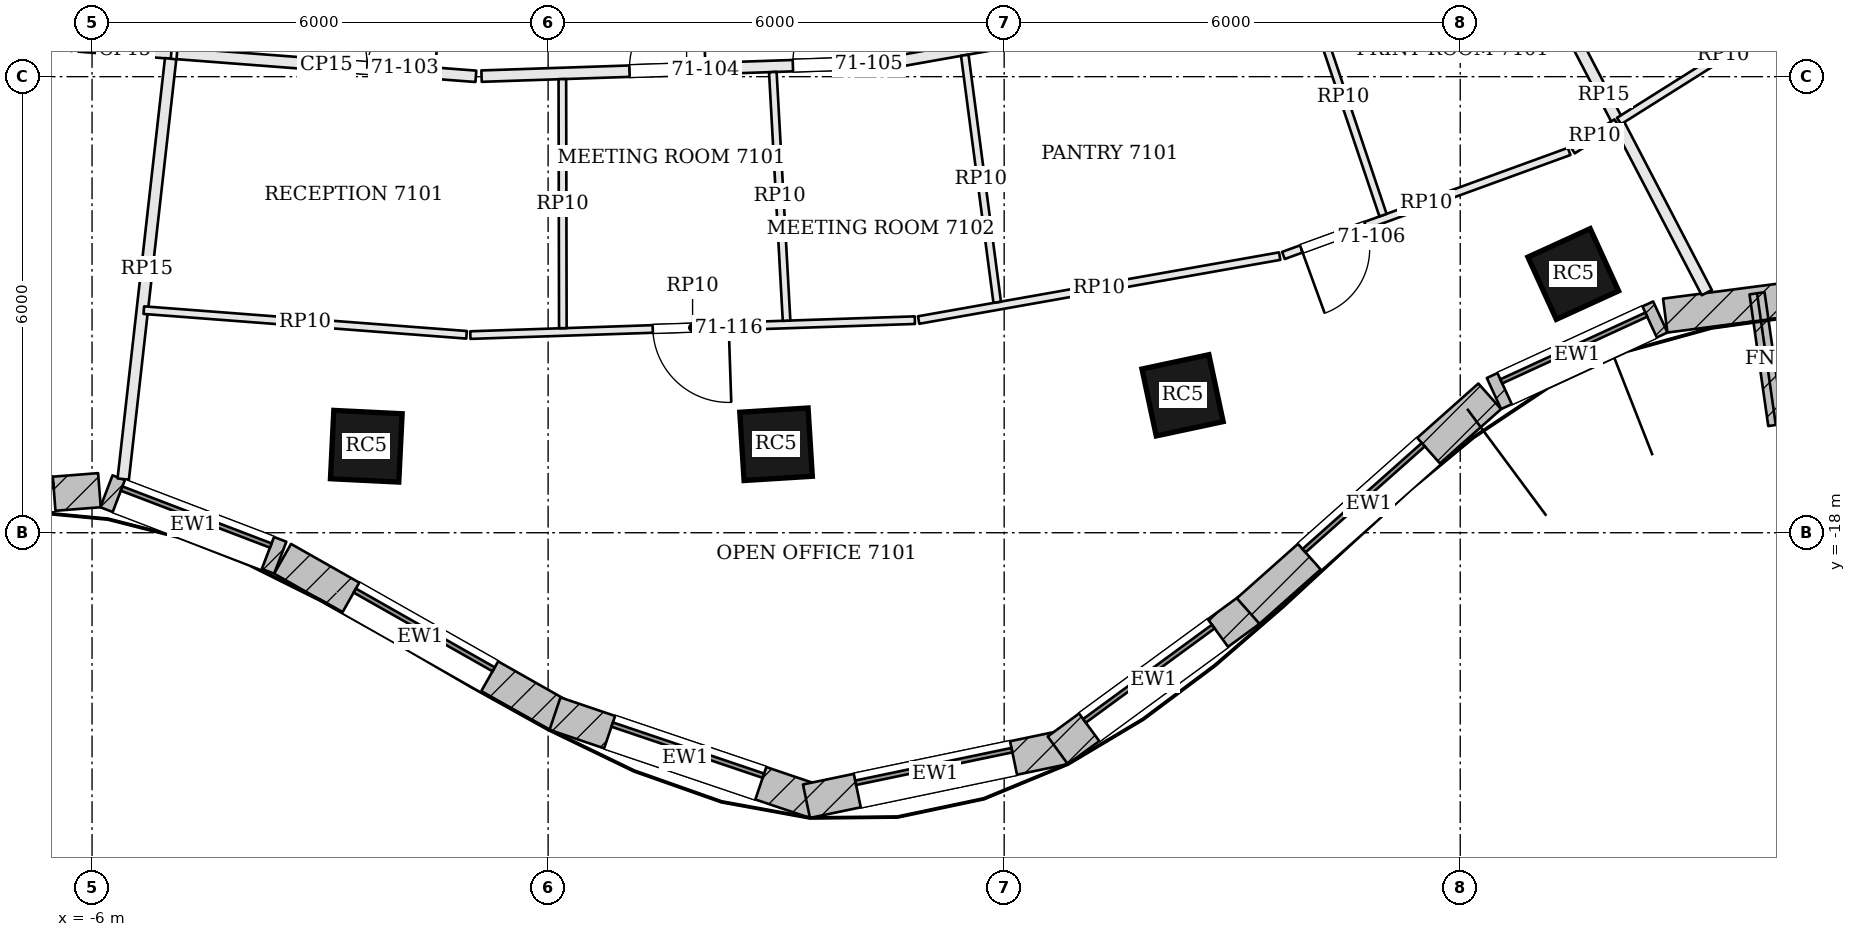
"""IFC4 building model, lengths in metres.
Left out: names, types, materials, properties, quantities, classifications, styles, units other than length and angle.
Written with IfcOpenShell. Run it as: python <this file> out.ifc"""

import sys

from ifc_helpers import new_model, si_unit, direction, frame, frame_2d, origin, origin_2d, place, context, subcontext, project, spatial, rectangle, extrude, element, fill, save


model = new_model("IFC4")
c1 = context("Model", 3, precision=1e-05, world=origin(), true_north=direction((0.0, 1.0)))
c2 = subcontext(c1, "Body", "Model", "MODEL_VIEW")
j1 = project(units=[si_unit("LENGTHUNIT", "METRE"), si_unit("PLANEANGLEUNIT", "RADIAN")], contexts=[c1])
p1 = place(None, origin())
s1 = spatial("IfcSite", under=j1, at=p1, CompositionType="ELEMENT")
p2 = place(p1, origin())
s2 = spatial("IfcBuilding", under=s1, at=p2, CompositionType="ELEMENT")
p3 = place(p2, frame((0.0, 0.0, 288.3)))
s3 = spatial("IfcBuildingStorey", under=s2, at=p3, CompositionType="ELEMENT", Elevation=288.3)
for number, where, z_axis, x_axis in (
    (1, (-2.392, -16.862, 0.0), (0.0, 0.0, 1.0), (0.999, -0.049, 0.0)),
    (2, (2.999, -16.836, 0.0), (0.0, 0.0, 1.0), (0.998, 0.062, 0.0)),
    (3, (8.347, -16.192, 0.0), (0.0, 0.0, 1.0), (0.978, 0.209, 0.0)),
    (4, (13.487, -14.596, 0.0), (0.0, 0.0, 1.0), (0.91, 0.415, 0.0)),
):
    element("IfcColumn", number, at=place(p3, frame(where, z_axis=z_axis, x_axis=x_axis)), inside=s3, PredefinedType="COLUMN", context=c2, shape_type="SweptSolid", body=[
        extrude(rectangle(XDim=0.9, YDim=0.9, at=origin_2d()), origin(), (0.0, 0.0, 1.0), 3.9),
    ])
p4 = place(p3, frame((-9.188, -17.697, 0.0), z_axis=(0.0, 0.0, 1.0), x_axis=(0.996964028691, 0.077863505548, 0.0)))
e5 = element("IfcWall", 5, at=p4, inside=s3, PredefinedType="SOLIDWALL", context=c2, shape_type="SweptSolid", body=[
    extrude(rectangle(XDim=3.295, YDim=0.45, at=frame_2d((1.648, 0.0))), origin(), (0.0, 0.0, 1.0), 3.7),
])
p5 = place(p4, frame((0.598, 0.0, 0.9)))
e6 = element("IfcOpeningElement", 6, at=p5, cuts=e5, PredefinedType="OPENING", context=c2, shape_type="SweptSolid", body=[
    extrude(rectangle(XDim=2.1, YDim=2.3, at=frame_2d((1.05, 1.15))), frame((0.0, 0.235, 0.0), z_axis=(0.0, -1.0, 0.0), x_axis=(1.0, 0.0, 0.0)), (0.0, 0.0, 1.0), 0.47),
])
p6 = place(p3, frame((-5.811, -17.455, 0.0), z_axis=(0.0, 0.0, 1.0), x_axis=(0.934122271306, -0.35695319336, 0.0)))
e7 = element("IfcWall", 7, at=p6, inside=s3, PredefinedType="SOLIDWALL", context=c2, shape_type="SweptSolid", body=[
    extrude(rectangle(XDim=2.448, YDim=0.45, at=frame_2d((1.224, 0.0))), origin(), (0.0, 0.0, 1.0), 3.7),
])
p7 = place(p6, frame((0.174, 0.0, 0.9)))
e8 = element("IfcOpeningElement", 8, at=p7, cuts=e7, PredefinedType="OPENING", context=c2, shape_type="SweptSolid", body=[
    extrude(rectangle(XDim=2.1, YDim=2.3, at=frame_2d((1.05, 1.15))), frame((0.0, 0.235, 0.0), z_axis=(0.0, -1.0, 0.0), x_axis=(1.0, 0.0, 0.0)), (0.0, 0.0, 1.0), 0.47),
])
p8 = place(p3, frame((-3.493, -18.343, 0.0), z_axis=(0.0, 0.0, 1.0), x_axis=(0.869825988853, -0.493358641473, 0.0)))
e9 = element("IfcWall", 9, at=p8, inside=s3, PredefinedType="SOLIDWALL", context=c2, shape_type="SweptSolid", body=[
    extrude(rectangle(XDim=4.165, YDim=0.45, at=frame_2d((2.083, 0.0))), origin(), (0.0, 0.0, 1.0), 3.7),
])
p9 = place(p8, frame((1.032, 0.0, 0.9)))
e10 = element("IfcOpeningElement", 10, at=p9, cuts=e9, PredefinedType="OPENING", context=c2, shape_type="SweptSolid", body=[
    extrude(rectangle(XDim=2.1, YDim=2.3, at=frame_2d((1.05, 1.15))), frame((0.0, 0.235, 0.0), z_axis=(0.0, -1.0, 0.0), x_axis=(1.0, 0.0, 0.0)), (0.0, 0.0, 1.0), 0.47),
])
p10 = place(p3, frame((0.091, -20.38, 0.0), z_axis=(0.0, 0.0, 1.0), x_axis=(0.947304227221, -0.320335294791, 0.0)))
e11 = element("IfcWall", 11, at=p10, inside=s3, PredefinedType="SOLIDWALL", context=c2, shape_type="SweptSolid", body=[
    extrude(rectangle(XDim=3.617, YDim=0.45, at=frame_2d((1.809, 0.0))), origin(), (0.0, 0.0, 1.0), 3.7),
])
p11 = place(p10, frame((0.759, 0.0, 0.9)))
e12 = element("IfcOpeningElement", 12, at=p11, cuts=e11, PredefinedType="OPENING", context=c2, shape_type="SweptSolid", body=[
    extrude(rectangle(XDim=2.1, YDim=2.3, at=frame_2d((1.05, 1.15))), frame((0.0, 0.235, 0.0), z_axis=(0.0, -1.0, 0.0), x_axis=(1.0, 0.0, 0.0)), (0.0, 0.0, 1.0), 0.47),
])
p12 = place(p3, frame((3.399, -21.532, 0.0), z_axis=(0.0, 0.0, 1.0), x_axis=(0.978915912181, 0.204263645512, 0.0)))
e13 = element("IfcWall", 13, at=p12, inside=s3, PredefinedType="SOLIDWALL", context=c2, shape_type="SweptSolid", body=[
    extrude(rectangle(XDim=3.466, YDim=0.45, at=frame_2d((1.733, 0.0))), origin(), (0.0, 0.0, 1.0), 3.7),
])
p13 = place(p12, frame((0.683, 0.0, 0.9)))
e14 = element("IfcOpeningElement", 14, at=p13, cuts=e13, PredefinedType="OPENING", context=c2, shape_type="SweptSolid", body=[
    extrude(rectangle(XDim=2.1, YDim=2.3, at=frame_2d((1.05, 1.15))), frame((0.0, 0.235, 0.0), z_axis=(0.0, -1.0, 0.0), x_axis=(1.0, 0.0, 0.0)), (0.0, 0.0, 1.0), 0.47),
])
p14 = place(p3, frame((6.705, -20.862, 0.0), z_axis=(0.0, 0.0, 1.0), x_axis=(0.806921336267, 0.590658917716, 0.0)))
e15 = element("IfcWall", 15, at=p14, inside=s3, PredefinedType="SOLIDWALL", context=c2, shape_type="SweptSolid", body=[
    extrude(rectangle(XDim=3.125, YDim=0.45, at=frame_2d((1.562, 0.0))), origin(), (0.0, 0.0, 1.0), 3.7),
])
p15 = place(p14, frame((0.512, 0.0, 0.9)))
e16 = element("IfcOpeningElement", 16, at=p15, cuts=e15, PredefinedType="OPENING", context=c2, shape_type="SweptSolid", body=[
    extrude(rectangle(XDim=2.1, YDim=2.3, at=frame_2d((1.05, 1.15))), frame((0.0, 0.235, 0.0), z_axis=(0.0, -1.0, 0.0), x_axis=(1.0, 0.0, 0.0)), (0.0, 0.0, 1.0), 0.47),
])
p16 = place(p3, frame((9.21, -19.03, 0.0), z_axis=(0.0, 0.0, 1.0), x_axis=(0.747396648191, 0.664378092861, 0.0)))
e17 = element("IfcWall", 17, at=p16, inside=s3, PredefinedType="SOLIDWALL", context=c2, shape_type="SweptSolid", body=[
    extrude(rectangle(XDim=4.252, YDim=0.45, at=frame_2d((2.126, 0.0))), origin(), (0.0, 0.0, 1.0), 3.7),
])
p17 = place(p16, frame((1.076, 0.0, 0.9)))
e18 = element("IfcOpeningElement", 18, at=p17, cuts=e17, PredefinedType="OPENING", context=c2, shape_type="SweptSolid", body=[
    extrude(rectangle(XDim=2.1, YDim=2.3, at=frame_2d((1.05, 1.15))), frame((0.0, 0.235, 0.0), z_axis=(0.0, -1.0, 0.0), x_axis=(1.0, 0.0, 0.0)), (0.0, 0.0, 1.0), 0.47),
])
p18 = place(p3, frame((12.444, -16.169, 0.0), z_axis=(0.0, 0.0, 1.0), x_axis=(0.908468904074, 0.417952449844, 0.0)))
e19 = element("IfcWall", 19, at=p18, inside=s3, PredefinedType="SOLIDWALL", context=c2, shape_type="SweptSolid", body=[
    extrude(rectangle(XDim=2.409, YDim=0.45, at=frame_2d((1.205, 0.0))), origin(), (0.0, 0.0, 1.0), 3.7),
])
p19 = place(p18, frame((0.155, 0.0, 0.9)))
e20 = element("IfcOpeningElement", 20, at=p19, cuts=e19, PredefinedType="OPENING", context=c2, shape_type="SweptSolid", body=[
    extrude(rectangle(XDim=2.1, YDim=2.3, at=frame_2d((1.05, 1.15))), frame((0.0, 0.235, 0.0), z_axis=(0.0, -1.0, 0.0), x_axis=(1.0, 0.0, 0.0)), (0.0, 0.0, 1.0), 0.47),
])
p20 = place(p3, frame((14.697, -15.143, 0.0), z_axis=(0.0, 0.0, 1.0), x_axis=(0.991631798411, 0.129098320597, 0.0)))
e21 = element("IfcWall", 21, at=p20, inside=s3, PredefinedType="SOLIDWALL", context=c2, shape_type="SweptSolid", body=[
    extrude(rectangle(XDim=5.547, YDim=0.45, at=frame_2d((2.773, 0.0))), origin(), (0.0, 0.0, 1.0), 3.7),
])
p21 = place(p20, frame((1.723, 0.0, 0.9)))
e22 = element("IfcOpeningElement", 22, at=p21, cuts=e21, PredefinedType="OPENING", context=c2, shape_type="SweptSolid", body=[
    extrude(rectangle(XDim=2.1, YDim=2.3, at=frame_2d((1.05, 1.15))), frame((0.0, 0.235, 0.0), z_axis=(0.0, -1.0, 0.0), x_axis=(1.0, 0.0, 0.0)), (0.0, 0.0, 1.0), 0.47),
])
p22 = place(p3, frame((15.905, -14.85, 0.0), z_axis=(0.0, 0.0, 1.0), x_axis=(0.140913490987, -0.990021912918, 0.0)))
e23 = element("IfcWall", 23, at=p22, inside=s3, PredefinedType="SOLIDWALL", context=c2, shape_type="SweptSolid", body=[
    extrude(rectangle(XDim=1.75, YDim=0.2, at=frame_2d((0.875, 0.0))), origin(), (0.0, 0.0, 1.0), 3.7),
])
p23 = place(p3, frame((-6.175, -11.596, 0.0), z_axis=(0.0, 0.0, 1.0), x_axis=(0.997106038867, -0.076023333621, 0.0)))
e24 = element("IfcWall", 24, at=p23, inside=s3, PredefinedType="PARTITIONING", context=c2, shape_type="SweptSolid", body=[
    extrude(rectangle(XDim=1.22, YDim=0.15, at=frame_2d((0.61, 0.0))), origin(), (0.0, 0.0, 1.0), 3.198),
])
p24 = place(p3, frame((-5.59, -17.294, 0.0), z_axis=(0.0, 0.0, 1.0), x_axis=(0.112044411854, 0.993703200041, 0.0)))
e25 = element("IfcWall", 25, at=p24, inside=s3, PredefinedType="PARTITIONING", context=c2, shape_type="SweptSolid", body=[
    extrude(rectangle(XDim=5.565, YDim=0.15, at=frame_2d((2.783, 0.0))), origin(), (0.0, 0.0, 1.0), 3.234),
])
p25 = place(p3, frame((-4.883, -11.695, 0.0), z_axis=(0.0, 0.0, 1.0), x_axis=(0.997096936577, -0.076142623207, 0.0)))
e26 = element("IfcWall", 26, at=p25, inside=s3, PredefinedType="PARTITIONING", context=c2, shape_type="SweptSolid", body=[
    extrude(rectangle(XDim=3.944, YDim=0.15, at=frame_2d((1.972, 0.0))), origin(), (0.0, 0.0, 1.0), 3.198),
])
p26 = place(p25, frame((1.604, 0.0, 0.0)))
e27 = element("IfcOpeningElement", 27, at=p26, cuts=e26, PredefinedType="OPENING", context=c2, shape_type="SweptSolid", body=[
    extrude(rectangle(XDim=1.8, YDim=2.1, at=frame_2d((0.9, 1.05))), frame((0.0, 0.085, 0.0), z_axis=(0.0, -1.0, 0.0), x_axis=(1.0, 0.0, 0.0)), (0.0, 0.0, 1.0), 0.17),
])
p27 = place(p3, frame((-0.875, -11.993, 0.0), z_axis=(0.0, 0.0, 1.0), x_axis=(0.999436745295, 0.033558786542, 0.0)))
e28 = element("IfcWall", 28, at=p27, inside=s3, PredefinedType="PARTITIONING", context=c2, shape_type="SweptSolid", body=[
    extrude(rectangle(XDim=5.398, YDim=0.15, at=frame_2d((2.699, 0.0))), origin(), (0.0, 0.0, 1.0), 3.198),
])
p28 = place(p27, frame((1.947, 0.0, 0.0)))
e29 = element("IfcOpeningElement", 29, at=p28, cuts=e28, PredefinedType="OPENING", context=c2, shape_type="SweptSolid", body=[
    extrude(rectangle(XDim=1.0, YDim=2.4, at=frame_2d((0.5, 1.2))), frame((0.0, 0.085, 0.0), z_axis=(0.0, -1.0, 0.0), x_axis=(1.0, 0.0, 0.0)), (0.0, 0.0, 1.0), 0.17),
])
p29 = place(p27, frame((4.098, 0.0, 0.0)))
e30 = element("IfcOpeningElement", 30, at=p29, cuts=e28, PredefinedType="OPENING", context=c2, shape_type="SweptSolid", body=[
    extrude(rectangle(XDim=1.0, YDim=2.4, at=frame_2d((0.5, 1.2))), frame((0.0, 0.085, 0.0), z_axis=(0.0, -1.0, 0.0), x_axis=(1.0, 0.0, 0.0)), (0.0, 0.0, 1.0), 0.17),
])
p30 = place(p3, frame((4.594, -11.799, 0.0), z_axis=(0.0, 0.0, 1.0), x_axis=(0.984693444773, 0.174295208833, 0.0)))
e31 = element("IfcWall", 31, at=p30, inside=s3, PredefinedType="PARTITIONING", context=c2, shape_type="SweptSolid", body=[
    extrude(rectangle(XDim=4.261, YDim=0.15, at=frame_2d((2.13, 0.0))), origin(), (0.0, 0.0, 1.0), 3.198),
])
p31 = place(p30, frame((2.05, 0.0, 0.0)))
e32 = element("IfcOpeningElement", 32, at=p31, cuts=e31, PredefinedType="OPENING", context=c2, shape_type="SweptSolid", body=[
    extrude(rectangle(XDim=1.0, YDim=2.1, at=frame_2d((0.5, 1.05))), frame((0.0, 0.085, 0.0), z_axis=(0.0, -1.0, 0.0), x_axis=(1.0, 0.0, 0.0)), (0.0, 0.0, 1.0), 0.17),
])
p32 = place(p3, frame((15.244, -14.841, 0.0), z_axis=(0.0, 0.0, 1.0), x_axis=(-0.462122511499, 0.886816093881, 0.0)))
e33 = element("IfcWall", 33, at=p32, inside=s3, PredefinedType="PARTITIONING", context=c2, shape_type="SweptSolid", body=[
    extrude(rectangle(XDim=5.871, YDim=0.15, at=frame_2d((2.935, 0.0))), origin(), (0.0, 0.0, 1.0), 3.234),
])
p33 = place(p3, frame((14.056, -12.604, 0.0), z_axis=(0.0, 0.0, 1.0), x_axis=(-0.846544184051, -0.532318461496, 0.0)))
e34 = element("IfcWall", 34, at=p33, inside=s3, PredefinedType="PARTITIONING", context=c2, shape_type="SweptSolid", body=[
    extrude(rectangle(XDim=0.681, YDim=0.1, at=frame_2d((0.34, 0.0))), origin(), (0.0, 0.0, 1.0), 3.198),
])
p34 = place(p3, frame((13.433, -12.984, 0.0), z_axis=(0.0, 0.0, 1.0), x_axis=(-0.939673979614, -0.342071355182, 0.0)))
e35 = element("IfcWall", 35, at=p34, inside=s3, PredefinedType="PARTITIONING", context=c2, shape_type="SweptSolid", body=[
    extrude(rectangle(XDim=4.0, YDim=0.1, at=frame_2d((2.0, 0.0))), origin(), (0.0, 0.0, 1.0), 3.198),
])
p35 = place(p34, frame((2.85, 0.0, 0.0)))
e36 = element("IfcOpeningElement", 36, at=p35, cuts=e35, PredefinedType="OPENING", context=c2, shape_type="SweptSolid", body=[
    extrude(rectangle(XDim=0.9, YDim=2.1, at=frame_2d((0.45, 1.05))), frame((0.0, 0.06, 0.0), z_axis=(0.0, -1.0, 0.0), x_axis=(1.0, 0.0, 0.0)), (0.0, 0.0, 1.0), 0.12),
])
p36 = place(p3, frame((9.625, -14.361, 0.0), z_axis=(0.0, 0.0, 1.0), x_axis=(-0.984691710098, -0.174305008716, 0.0)))
e37 = element("IfcWall", 37, at=p36, inside=s3, PredefinedType="PARTITIONING", context=c2, shape_type="SweptSolid", body=[
    extrude(rectangle(XDim=4.824, YDim=0.1, at=frame_2d((2.412, 0.0))), origin(), (0.0, 0.0, 1.0), 3.198),
])
p37 = place(p3, frame((4.825, -15.203, 0.0), z_axis=(0.0, 0.0, 1.0), x_axis=(-0.999435699456, -0.033589918924, 0.0)))
e38 = element("IfcWall", 38, at=p37, inside=s3, PredefinedType="PARTITIONING", context=c2, shape_type="SweptSolid", body=[
    extrude(rectangle(XDim=5.851, YDim=0.1, at=frame_2d((2.926, 0.0))), origin(), (0.0, 0.0, 1.0), 3.198),
])
p38 = place(p37, frame((2.45, 0.0, 0.0)))
e39 = element("IfcOpeningElement", 39, at=p38, cuts=e38, PredefinedType="OPENING", context=c2, shape_type="SweptSolid", body=[
    extrude(rectangle(XDim=1.0, YDim=2.4, at=frame_2d((0.5, 1.2))), frame((0.0, 0.06, 0.0), z_axis=(0.0, -1.0, 0.0), x_axis=(1.0, 0.0, 0.0)), (0.0, 0.0, 1.0), 0.12),
])
p39 = place(p3, frame((-1.073, -15.396, 0.0), z_axis=(0.0, 0.0, 1.0), x_axis=(-0.997093140471, 0.076192317369, 0.0)))
e40 = element("IfcWall", 40, at=p39, inside=s3, PredefinedType="PARTITIONING", context=c2, shape_type="SweptSolid", body=[
    extrude(rectangle(XDim=4.259, YDim=0.1, at=frame_2d((2.129, 0.0))), origin(), (0.0, 0.0, 1.0), 3.198),
])
p40 = place(p3, frame((0.188, -12.032, 0.0), z_axis=(0.0, 0.0, 1.0), x_axis=(0.001937258864, -0.999998123512, 0.0)))
e41 = element("IfcWall", 41, at=p40, inside=s3, PredefinedType="PARTITIONING", context=c2, shape_type="SweptSolid", body=[
    extrude(rectangle(XDim=3.277, YDim=0.1, at=frame_2d((1.638, 0.0))), origin(), (0.0, 0.0, 1.0), 3.198),
])
p41 = place(p3, frame((2.956, -11.939, 0.0), z_axis=(0.0, 0.0, 1.0), x_axis=(0.055226477976, -0.998473853504, 0.0)))
e42 = element("IfcWall", 42, at=p41, inside=s3, PredefinedType="PARTITIONING", context=c2, shape_type="SweptSolid", body=[
    extrude(rectangle(XDim=3.276, YDim=0.1, at=frame_2d((1.638, 0.0))), origin(), (0.0, 0.0, 1.0), 3.198),
])
p42 = place(p3, frame((5.482, -11.718, 0.0), z_axis=(0.0, 0.0, 1.0), x_axis=(0.130173255727, -0.991491262439, 0.0)))
e43 = element("IfcWall", 43, at=p42, inside=s3, PredefinedType="PARTITIONING", context=c2, shape_type="SweptSolid", body=[
    extrude(rectangle(XDim=3.278, YDim=0.1, at=frame_2d((1.639, 0.0))), origin(), (0.0, 0.0, 1.0), 3.198),
])
p43 = place(p3, frame((9.94, -10.717, 0.0), z_axis=(0.0, 0.0, 1.0), x_axis=(0.318730603816, -0.947845347191, 0.0)))
e44 = element("IfcWall", 44, at=p43, inside=s3, PredefinedType="PARTITIONING", context=c2, shape_type="SweptSolid", body=[
    extrude(rectangle(XDim=3.276, YDim=0.1, at=frame_2d((1.638, 0.0))), origin(), (0.0, 0.0, 1.0), 3.198),
])
p44 = place(p3, frame((16.831, -10.858, 0.0), z_axis=(0.0, 0.0, 1.0), x_axis=(-0.846427876971, -0.532503379413, 0.0)))
e45 = element("IfcWall", 45, at=p44, inside=s3, PredefinedType="PARTITIONING", context=c2, shape_type="SweptSolid", body=[
    extrude(rectangle(XDim=3.239, YDim=0.1, at=frame_2d((1.62, 0.0))), origin(), (0.0, 0.0, 1.0), 3.198),
])
p45 = place(p5, origin())
e46 = element("IfcWindow", 46, at=p45, inside=s3, PartitioningType="SINGLE_PANEL", PredefinedType="WINDOW", context=c2, shape_type="SweptSolid", body=[
    extrude(rectangle(XDim=2.1, YDim=2.3, at=frame_2d((1.05, 1.15))), frame((0.0, 0.135, 0.0), z_axis=(0.0, -1.0, 0.0), x_axis=(1.0, 0.0, 0.0)), (0.0, 0.0, 1.0), 0.06),
])
fill(e6, e46)
p46 = place(p7, origin())
e47 = element("IfcWindow", 47, at=p46, inside=s3, PartitioningType="SINGLE_PANEL", PredefinedType="WINDOW", context=c2, shape_type="SweptSolid", body=[
    extrude(rectangle(XDim=2.1, YDim=2.3, at=frame_2d((1.05, 1.15))), frame((0.0, 0.135, 0.0), z_axis=(0.0, -1.0, 0.0), x_axis=(1.0, 0.0, 0.0)), (0.0, 0.0, 1.0), 0.06),
])
fill(e8, e47)
p47 = place(p9, origin())
e48 = element("IfcWindow", 48, at=p47, inside=s3, PartitioningType="SINGLE_PANEL", PredefinedType="WINDOW", context=c2, shape_type="SweptSolid", body=[
    extrude(rectangle(XDim=2.1, YDim=2.3, at=frame_2d((1.05, 1.15))), frame((0.0, 0.135, 0.0), z_axis=(0.0, -1.0, 0.0), x_axis=(1.0, 0.0, 0.0)), (0.0, 0.0, 1.0), 0.06),
])
fill(e10, e48)
p48 = place(p11, origin())
e49 = element("IfcWindow", 49, at=p48, inside=s3, PartitioningType="SINGLE_PANEL", PredefinedType="WINDOW", context=c2, shape_type="SweptSolid", body=[
    extrude(rectangle(XDim=2.1, YDim=2.3, at=frame_2d((1.05, 1.15))), frame((0.0, 0.135, 0.0), z_axis=(0.0, -1.0, 0.0), x_axis=(1.0, 0.0, 0.0)), (0.0, 0.0, 1.0), 0.06),
])
fill(e12, e49)
p49 = place(p13, origin())
e50 = element("IfcWindow", 50, at=p49, inside=s3, PartitioningType="SINGLE_PANEL", PredefinedType="WINDOW", context=c2, shape_type="SweptSolid", body=[
    extrude(rectangle(XDim=2.1, YDim=2.3, at=frame_2d((1.05, 1.15))), frame((0.0, 0.135, 0.0), z_axis=(0.0, -1.0, 0.0), x_axis=(1.0, 0.0, 0.0)), (0.0, 0.0, 1.0), 0.06),
])
fill(e14, e50)
p50 = place(p15, origin())
e51 = element("IfcWindow", 51, at=p50, inside=s3, PartitioningType="SINGLE_PANEL", PredefinedType="WINDOW", context=c2, shape_type="SweptSolid", body=[
    extrude(rectangle(XDim=2.1, YDim=2.3, at=frame_2d((1.05, 1.15))), frame((0.0, 0.135, 0.0), z_axis=(0.0, -1.0, 0.0), x_axis=(1.0, 0.0, 0.0)), (0.0, 0.0, 1.0), 0.06),
])
fill(e16, e51)
p51 = place(p17, origin())
e52 = element("IfcWindow", 52, at=p51, inside=s3, PartitioningType="SINGLE_PANEL", PredefinedType="WINDOW", context=c2, shape_type="SweptSolid", body=[
    extrude(rectangle(XDim=2.1, YDim=2.3, at=frame_2d((1.05, 1.15))), frame((0.0, 0.135, 0.0), z_axis=(0.0, -1.0, 0.0), x_axis=(1.0, 0.0, 0.0)), (0.0, 0.0, 1.0), 0.06),
])
fill(e18, e52)
p52 = place(p19, origin())
e53 = element("IfcWindow", 53, at=p52, inside=s3, PartitioningType="SINGLE_PANEL", PredefinedType="WINDOW", context=c2, shape_type="SweptSolid", body=[
    extrude(rectangle(XDim=2.1, YDim=2.3, at=frame_2d((1.05, 1.15))), frame((0.0, 0.135, 0.0), z_axis=(0.0, -1.0, 0.0), x_axis=(1.0, 0.0, 0.0)), (0.0, 0.0, 1.0), 0.06),
])
fill(e20, e53)
p53 = place(p26, origin())
e54 = element("IfcDoor", 54, at=p53, inside=s3, OperationType="DOUBLE_DOOR_SINGLE_SWING", PredefinedType="DOOR", context=c2, shape_type="SweptSolid", body=[
    extrude(rectangle(XDim=1.8, YDim=2.1, at=frame_2d((0.9, 1.05))), frame((0.0, 0.025, 0.0), z_axis=(0.0, -1.0, 0.0), x_axis=(1.0, 0.0, 0.0)), (0.0, 0.0, 1.0), 0.05),
])
fill(e27, e54)
p54 = place(p28, origin())
e55 = element("IfcDoor", 55, at=p54, inside=s3, OperationType="SINGLE_SWING_RIGHT", PredefinedType="DOOR", context=c2, shape_type="SweptSolid", body=[
    extrude(rectangle(XDim=1.0, YDim=2.4, at=frame_2d((0.5, 1.2))), frame((0.0, 0.025, 0.0), z_axis=(0.0, -1.0, 0.0), x_axis=(1.0, 0.0, 0.0)), (0.0, 0.0, 1.0), 0.05),
])
fill(e29, e55)
p55 = place(p29, origin())
e56 = element("IfcDoor", 56, at=p55, inside=s3, OperationType="SINGLE_SWING_RIGHT", PredefinedType="DOOR", context=c2, shape_type="SweptSolid", body=[
    extrude(rectangle(XDim=1.0, YDim=2.4, at=frame_2d((0.5, 1.2))), frame((0.0, 0.025, 0.0), z_axis=(0.0, -1.0, 0.0), x_axis=(1.0, 0.0, 0.0)), (0.0, 0.0, 1.0), 0.05),
])
fill(e30, e56)
p56 = place(p35, origin())
e57 = element("IfcDoor", 57, at=p56, inside=s3, OperationType="SINGLE_SWING_RIGHT", PredefinedType="DOOR", context=c2, shape_type="SweptSolid", body=[
    extrude(rectangle(XDim=0.9, YDim=2.1, at=frame_2d((0.45, 1.05))), frame((0.0, 0.025, 0.0), z_axis=(0.0, -1.0, 0.0), x_axis=(1.0, 0.0, 0.0)), (0.0, 0.0, 1.0), 0.05),
])
fill(e36, e57)
p57 = place(p38, origin())
e58 = element("IfcDoor", 58, at=p57, inside=s3, OperationType="SINGLE_SWING_LEFT", PredefinedType="DOOR", context=c2, shape_type="SweptSolid", body=[
    extrude(rectangle(XDim=1.0, YDim=2.4, at=frame_2d((0.5, 1.2))), frame((0.0, 0.025, 0.0), z_axis=(0.0, -1.0, 0.0), x_axis=(1.0, 0.0, 0.0)), (0.0, 0.0, 1.0), 0.05),
])
fill(e39, e58)
save(model, sys.argv[1])
